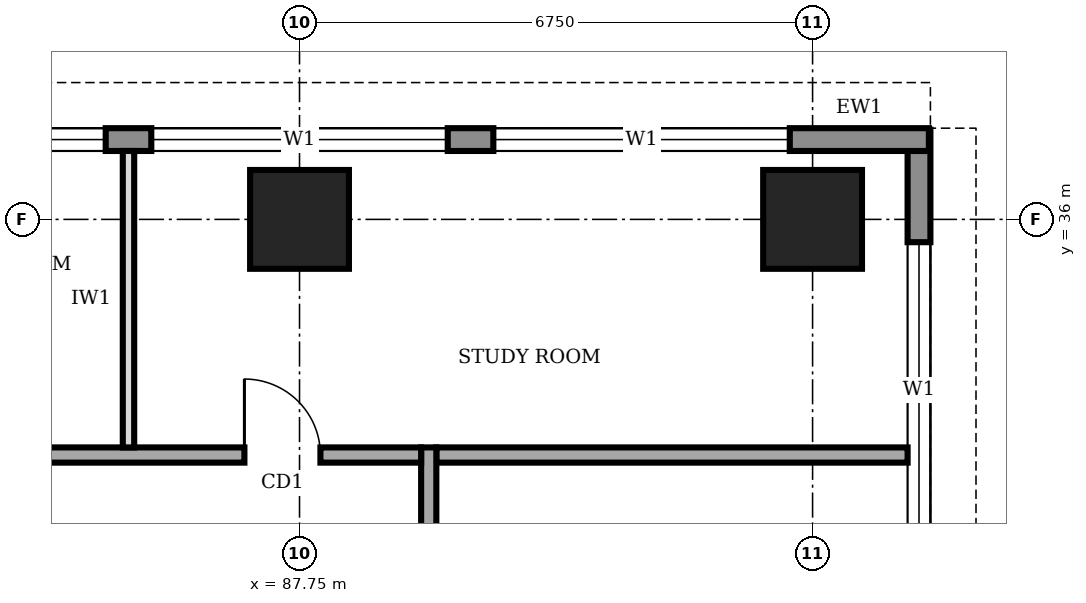
"""IFC4 building model, lengths in metres.
Left out: names, types, materials, properties, quantities, classifications, styles, units other than length and angle.
Written with IfcOpenShell. Run it as: python <this file> out.ifc"""

import sys

from ifc_helpers import new_model, si_unit, direction, frame, frame_2d, origin, origin_2d, place, context, subcontext, project, spatial, rectangle, extrude, element, fill, save


model = new_model("IFC4")
c1 = context("Model", 3, precision=1e-05, world=origin(), true_north=direction((0.0, 1.0)))
c2 = subcontext(c1, "Body", "Model", "MODEL_VIEW")
j1 = project(units=[si_unit("LENGTHUNIT", "METRE"), si_unit("PLANEANGLEUNIT", "RADIAN")], contexts=[c1])
p1 = place(None, origin())
s1 = spatial("IfcSite", under=j1, at=p1, CompositionType="ELEMENT")
p2 = place(p1, origin())
s2 = spatial("IfcBuilding", under=s1, at=p2, CompositionType="ELEMENT")
p3 = place(p2, frame((0.0, 0.0, 221.0)))
s3 = spatial("IfcBuildingStorey", under=s2, at=p3, CompositionType="ELEMENT", Elevation=221.0)
for number, where, z_axis, x_axis in (
    (1, (87.75, 36.0, 0.0), (0.0, 0.0, 1.0), (1.0, 0.0, 0.0)),
    (2, (94.5, 36.0, 0.0), (0.0, 0.0, 1.0), (1.0, 0.0, 0.0)),
):
    element("IfcColumn", number, at=place(p3, frame(where, z_axis=z_axis, x_axis=x_axis)), inside=s3, PredefinedType="COLUMN", context=c2, shape_type="SweptSolid", body=[
        extrude(rectangle(XDim=1.3, YDim=1.3, at=origin_2d()), origin(), (0.0, 0.0, 1.0), 4.0),
    ])
p4 = place(p3, frame((95.9, 3.32, 0.0), z_axis=(0.0, 0.0, 1.0), x_axis=(0.0, 1.0, 0.0)))
e3 = element("IfcWall", 3, at=p4, inside=s3, PredefinedType="STANDARD", context=c2, shape_type="SweptSolid", body=[
    extrude(rectangle(XDim=33.86, YDim=0.3, at=frame_2d((16.93, 0.0))), origin(), (0.0, 0.0, 1.0), 3.75),
])
p5 = place(p4, frame((1.48, 0.0, 0.9)))
e4 = element("IfcOpeningElement", 4, at=p5, cuts=e3, PredefinedType="OPENING", context=c2, shape_type="SweptSolid", body=[
    extrude(rectangle(XDim=3.9, YDim=2.2, at=frame_2d((1.95, 1.1))), frame((0.0, 0.16, 0.0), z_axis=(0.0, -1.0, 0.0), x_axis=(1.0, 0.0, 0.0)), (0.0, 0.0, 1.0), 0.32),
])
p6 = place(p4, frame((5.98, 0.0, 0.9)))
e5 = element("IfcOpeningElement", 5, at=p6, cuts=e3, PredefinedType="OPENING", context=c2, shape_type="SweptSolid", body=[
    extrude(rectangle(XDim=3.9, YDim=2.2, at=frame_2d((1.95, 1.1))), frame((0.0, 0.16, 0.0), z_axis=(0.0, -1.0, 0.0), x_axis=(1.0, 0.0, 0.0)), (0.0, 0.0, 1.0), 0.32),
])
p7 = place(p4, frame((10.48, 0.0, 0.9)))
e6 = element("IfcOpeningElement", 6, at=p7, cuts=e3, PredefinedType="OPENING", context=c2, shape_type="SweptSolid", body=[
    extrude(rectangle(XDim=3.9, YDim=2.2, at=frame_2d((1.95, 1.1))), frame((0.0, 0.16, 0.0), z_axis=(0.0, -1.0, 0.0), x_axis=(1.0, 0.0, 0.0)), (0.0, 0.0, 1.0), 0.32),
])
p8 = place(p4, frame((14.98, 0.0, 0.9)))
e7 = element("IfcOpeningElement", 7, at=p8, cuts=e3, PredefinedType="OPENING", context=c2, shape_type="SweptSolid", body=[
    extrude(rectangle(XDim=3.9, YDim=2.2, at=frame_2d((1.95, 1.1))), frame((0.0, 0.16, 0.0), z_axis=(0.0, -1.0, 0.0), x_axis=(1.0, 0.0, 0.0)), (0.0, 0.0, 1.0), 0.32),
])
p9 = place(p4, frame((19.48, 0.0, 0.9)))
e8 = element("IfcOpeningElement", 8, at=p9, cuts=e3, PredefinedType="OPENING", context=c2, shape_type="SweptSolid", body=[
    extrude(rectangle(XDim=3.9, YDim=2.2, at=frame_2d((1.95, 1.1))), frame((0.0, 0.16, 0.0), z_axis=(0.0, -1.0, 0.0), x_axis=(1.0, 0.0, 0.0)), (0.0, 0.0, 1.0), 0.32),
])
p10 = place(p4, frame((23.98, 0.0, 0.9)))
e9 = element("IfcOpeningElement", 9, at=p10, cuts=e3, PredefinedType="OPENING", context=c2, shape_type="SweptSolid", body=[
    extrude(rectangle(XDim=3.9, YDim=2.2, at=frame_2d((1.95, 1.1))), frame((0.0, 0.16, 0.0), z_axis=(0.0, -1.0, 0.0), x_axis=(1.0, 0.0, 0.0)), (0.0, 0.0, 1.0), 0.32),
])
p11 = place(p4, frame((28.48, 0.0, 0.9)))
e10 = element("IfcOpeningElement", 10, at=p11, cuts=e3, PredefinedType="OPENING", context=c2, shape_type="SweptSolid", body=[
    extrude(rectangle(XDim=3.9, YDim=2.2, at=frame_2d((1.95, 1.1))), frame((0.0, 0.16, 0.0), z_axis=(0.0, -1.0, 0.0), x_axis=(1.0, 0.0, 0.0)), (0.0, 0.0, 1.0), 0.32),
])
p12 = place(p3, frame((96.03, 37.05, 0.0), z_axis=(0.0, 0.0, 1.0), x_axis=(-1.0, 0.0, 0.0)))
e11 = element("IfcWall", 11, at=p12, inside=s3, PredefinedType="STANDARD", context=c2, shape_type="SweptSolid", body=[
    extrude(rectangle(XDim=29.91, YDim=0.3, at=frame_2d((14.955, 0.0))), origin(), (0.0, 0.0, 1.0), 3.75),
])
p13 = place(p12, frame((24.33, 0.0, 0.9)))
e12 = element("IfcOpeningElement", 12, at=p13, cuts=e11, PredefinedType="OPENING", context=c2, shape_type="SweptSolid", body=[
    extrude(rectangle(XDim=3.9, YDim=2.2, at=frame_2d((1.95, 1.1))), frame((0.0, 0.16, 0.0), z_axis=(0.0, -1.0, 0.0), x_axis=(1.0, 0.0, 0.0)), (0.0, 0.0, 1.0), 0.32),
])
p14 = place(p12, frame((19.83, 0.0, 0.9)))
e13 = element("IfcOpeningElement", 13, at=p14, cuts=e11, PredefinedType="OPENING", context=c2, shape_type="SweptSolid", body=[
    extrude(rectangle(XDim=3.9, YDim=2.2, at=frame_2d((1.95, 1.1))), frame((0.0, 0.16, 0.0), z_axis=(0.0, -1.0, 0.0), x_axis=(1.0, 0.0, 0.0)), (0.0, 0.0, 1.0), 0.32),
])
p15 = place(p12, frame((15.33, 0.0, 0.9)))
e14 = element("IfcOpeningElement", 14, at=p15, cuts=e11, PredefinedType="OPENING", context=c2, shape_type="SweptSolid", body=[
    extrude(rectangle(XDim=3.9, YDim=2.2, at=frame_2d((1.95, 1.1))), frame((0.0, 0.16, 0.0), z_axis=(0.0, -1.0, 0.0), x_axis=(1.0, 0.0, 0.0)), (0.0, 0.0, 1.0), 0.32),
])
p16 = place(p12, frame((10.83, 0.0, 0.9)))
e15 = element("IfcOpeningElement", 15, at=p16, cuts=e11, PredefinedType="OPENING", context=c2, shape_type="SweptSolid", body=[
    extrude(rectangle(XDim=3.9, YDim=2.2, at=frame_2d((1.95, 1.1))), frame((0.0, 0.16, 0.0), z_axis=(0.0, -1.0, 0.0), x_axis=(1.0, 0.0, 0.0)), (0.0, 0.0, 1.0), 0.32),
])
p17 = place(p12, frame((6.33, 0.0, 0.9)))
e16 = element("IfcOpeningElement", 16, at=p17, cuts=e11, PredefinedType="OPENING", context=c2, shape_type="SweptSolid", body=[
    extrude(rectangle(XDim=3.9, YDim=2.2, at=frame_2d((1.95, 1.1))), frame((0.0, 0.16, 0.0), z_axis=(0.0, -1.0, 0.0), x_axis=(1.0, 0.0, 0.0)), (0.0, 0.0, 1.0), 0.32),
])
p18 = place(p12, frame((1.83, 0.0, 0.9)))
e17 = element("IfcOpeningElement", 17, at=p18, cuts=e11, PredefinedType="OPENING", context=c2, shape_type="SweptSolid", body=[
    extrude(rectangle(XDim=3.9, YDim=2.2, at=frame_2d((1.95, 1.1))), frame((0.0, 0.16, 0.0), z_axis=(0.0, -1.0, 0.0), x_axis=(1.0, 0.0, 0.0)), (0.0, 0.0, 1.0), 0.32),
])
p19 = place(p3, frame((89.45, 9.2, 0.0), z_axis=(0.0, 0.0, 1.0), x_axis=(0.0, 1.0, 0.0)))
e18 = element("IfcWall", 18, at=p19, inside=s3, PredefinedType="SOLIDWALL", context=c2, shape_type="SweptSolid", body=[
    extrude(rectangle(XDim=23.8, YDim=0.2, at=frame_2d((11.9, 0.0))), origin(), (0.0, 0.0, 1.0), 3.75),
])
p20 = place(p19, frame((1.55, 0.0, 0.0)))
e19 = element("IfcOpeningElement", 19, at=p20, cuts=e18, PredefinedType="OPENING", context=c2, shape_type="SweptSolid", body=[
    extrude(rectangle(XDim=1.0, YDim=2.1, at=frame_2d((0.5, 1.05))), frame((0.0, 0.11, 0.0), z_axis=(0.0, -1.0, 0.0), x_axis=(1.0, 0.0, 0.0)), (0.0, 0.0, 1.0), 0.22),
])
p21 = place(p19, frame((4.9, 0.0, 0.0)))
e20 = element("IfcOpeningElement", 20, at=p21, cuts=e18, PredefinedType="OPENING", context=c2, shape_type="SweptSolid", body=[
    extrude(rectangle(XDim=1.0, YDim=2.1, at=frame_2d((0.5, 1.05))), frame((0.0, 0.11, 0.0), z_axis=(0.0, -1.0, 0.0), x_axis=(1.0, 0.0, 0.0)), (0.0, 0.0, 1.0), 0.22),
])
p22 = place(p19, frame((8.0, 0.0, 0.0)))
e21 = element("IfcOpeningElement", 21, at=p22, cuts=e18, PredefinedType="OPENING", context=c2, shape_type="SweptSolid", body=[
    extrude(rectangle(XDim=0.9, YDim=2.1, at=frame_2d((0.45, 1.05))), frame((0.0, 0.11, 0.0), z_axis=(0.0, -1.0, 0.0), x_axis=(1.0, 0.0, 0.0)), (0.0, 0.0, 1.0), 0.22),
])
p23 = place(p19, frame((11.05, 0.0, 0.0)))
e22 = element("IfcOpeningElement", 22, at=p23, cuts=e18, PredefinedType="OPENING", context=c2, shape_type="SweptSolid", body=[
    extrude(rectangle(XDim=0.9, YDim=2.1, at=frame_2d((0.45, 1.05))), frame((0.0, 0.11, 0.0), z_axis=(0.0, -1.0, 0.0), x_axis=(1.0, 0.0, 0.0)), (0.0, 0.0, 1.0), 0.22),
])
p24 = place(p19, frame((15.75, 0.0, 0.0)))
e23 = element("IfcOpeningElement", 23, at=p24, cuts=e18, PredefinedType="OPENING", context=c2, shape_type="SweptSolid", body=[
    extrude(rectangle(XDim=0.9, YDim=2.1, at=frame_2d((0.45, 1.05))), frame((0.0, 0.11, 0.0), z_axis=(0.0, -1.0, 0.0), x_axis=(1.0, 0.0, 0.0)), (0.0, 0.0, 1.0), 0.22),
])
p25 = place(p19, frame((13.1, 0.0, 0.0)))
e24 = element("IfcOpeningElement", 24, at=p25, cuts=e18, PredefinedType="OPENING", context=c2, shape_type="SweptSolid", body=[
    extrude(rectangle(XDim=1.0, YDim=2.1, at=frame_2d((0.5, 1.05))), frame((0.0, 0.11, 0.0), z_axis=(0.0, -1.0, 0.0), x_axis=(1.0, 0.0, 0.0)), (0.0, 0.0, 1.0), 0.22),
])
p26 = place(p19, frame((20.3, 0.0, 0.0)))
e25 = element("IfcOpeningElement", 25, at=p26, cuts=e18, PredefinedType="OPENING", context=c2, shape_type="SweptSolid", body=[
    extrude(rectangle(XDim=1.0, YDim=2.1, at=frame_2d((0.5, 1.05))), frame((0.0, 0.11, 0.0), z_axis=(0.0, -1.0, 0.0), x_axis=(1.0, 0.0, 0.0)), (0.0, 0.0, 1.0), 0.22),
])
p27 = place(p3, frame((89.35, 32.9, 0.0), z_axis=(0.0, 0.0, 1.0), x_axis=(-1.0, 0.0, 0.0)))
e26 = element("IfcWall", 26, at=p27, inside=s3, PredefinedType="SOLIDWALL", context=c2, shape_type="SweptSolid", body=[
    extrude(rectangle(XDim=16.9, YDim=0.2, at=frame_2d((8.45, 0.0))), origin(), (0.0, 0.0, 1.0), 3.75),
])
p28 = place(p27, frame((14.375, 0.0, 0.0)))
e27 = element("IfcOpeningElement", 27, at=p28, cuts=e26, PredefinedType="OPENING", context=c2, shape_type="SweptSolid", body=[
    extrude(rectangle(XDim=1.0, YDim=2.1, at=frame_2d((0.5, 1.05))), frame((0.0, 0.11, 0.0), z_axis=(0.0, -1.0, 0.0), x_axis=(1.0, 0.0, 0.0)), (0.0, 0.0, 1.0), 0.22),
])
p29 = place(p27, frame((1.325, 0.0, 0.0)))
e28 = element("IfcOpeningElement", 28, at=p29, cuts=e26, PredefinedType="OPENING", context=c2, shape_type="SweptSolid", body=[
    extrude(rectangle(XDim=1.0, YDim=2.1, at=frame_2d((0.5, 1.05))), frame((0.0, 0.11, 0.0), z_axis=(0.0, -1.0, 0.0), x_axis=(1.0, 0.0, 0.0)), (0.0, 0.0, 1.0), 0.22),
])
p30 = place(p3, frame((89.55, 32.9, 0.0), z_axis=(0.0, 0.0, 1.0), x_axis=(1.0, 0.0, 0.0)))
e29 = element("IfcWall", 29, at=p30, inside=s3, PredefinedType="SOLIDWALL", context=c2, shape_type="SweptSolid", body=[
    extrude(rectangle(XDim=6.2, YDim=0.2, at=frame_2d((3.1, 0.0))), origin(), (0.0, 0.0, 1.0), 3.75),
])
p31 = place(p3, frame((85.5, 33.0, 0.0), z_axis=(0.0, 0.0, 1.0), x_axis=(0.0, 1.0, 0.0)))
e30 = element("IfcWall", 30, at=p31, inside=s3, PredefinedType="PARTITIONING", context=c2, shape_type="SweptSolid", body=[
    extrude(rectangle(XDim=3.9, YDim=0.15, at=frame_2d((1.95, 0.0))), origin(), (0.0, 0.0, 1.0), 3.75),
])
p32 = place(p11, origin())
e31 = element("IfcWindow", 31, at=p32, inside=s3, PartitioningType="SINGLE_PANEL", PredefinedType="WINDOW", context=c2, shape_type="SweptSolid", body=[
    extrude(rectangle(XDim=3.9, YDim=2.2, at=frame_2d((1.95, 1.1))), frame((0.0, 0.03, 0.0), z_axis=(0.0, -1.0, 0.0), x_axis=(1.0, 0.0, 0.0)), (0.0, 0.0, 1.0), 0.06),
])
fill(e10, e31)
p33 = place(p16, origin())
e32 = element("IfcWindow", 32, at=p33, inside=s3, PartitioningType="SINGLE_PANEL", PredefinedType="WINDOW", context=c2, shape_type="SweptSolid", body=[
    extrude(rectangle(XDim=3.9, YDim=2.2, at=frame_2d((1.95, 1.1))), frame((0.0, 0.03, 0.0), z_axis=(0.0, -1.0, 0.0), x_axis=(1.0, 0.0, 0.0)), (0.0, 0.0, 1.0), 0.06),
])
fill(e15, e32)
p34 = place(p17, origin())
e33 = element("IfcWindow", 33, at=p34, inside=s3, PartitioningType="SINGLE_PANEL", PredefinedType="WINDOW", context=c2, shape_type="SweptSolid", body=[
    extrude(rectangle(XDim=3.9, YDim=2.2, at=frame_2d((1.95, 1.1))), frame((0.0, 0.03, 0.0), z_axis=(0.0, -1.0, 0.0), x_axis=(1.0, 0.0, 0.0)), (0.0, 0.0, 1.0), 0.06),
])
fill(e16, e33)
p35 = place(p18, origin())
e34 = element("IfcWindow", 34, at=p35, inside=s3, PartitioningType="SINGLE_PANEL", PredefinedType="WINDOW", context=c2, shape_type="SweptSolid", body=[
    extrude(rectangle(XDim=3.9, YDim=2.2, at=frame_2d((1.95, 1.1))), frame((0.0, 0.03, 0.0), z_axis=(0.0, -1.0, 0.0), x_axis=(1.0, 0.0, 0.0)), (0.0, 0.0, 1.0), 0.06),
])
fill(e17, e34)
p36 = place(p29, frame((1.0, 0.0, 0.0), z_axis=(0.0, 0.0, 1.0), x_axis=(-1.0, 0.0, 0.0)))
e35 = element("IfcDoor", 35, at=p36, inside=s3, OperationType="SINGLE_SWING_LEFT", PredefinedType="DOOR", context=c2, shape_type="SweptSolid", body=[
    extrude(rectangle(XDim=1.0, YDim=2.1, at=frame_2d((0.5, 1.05))), frame((0.0, 0.025, 0.0), z_axis=(0.0, -1.0, 0.0), x_axis=(1.0, 0.0, 0.0)), (0.0, 0.0, 1.0), 0.05),
])
fill(e28, e35)
save(model, sys.argv[1])
